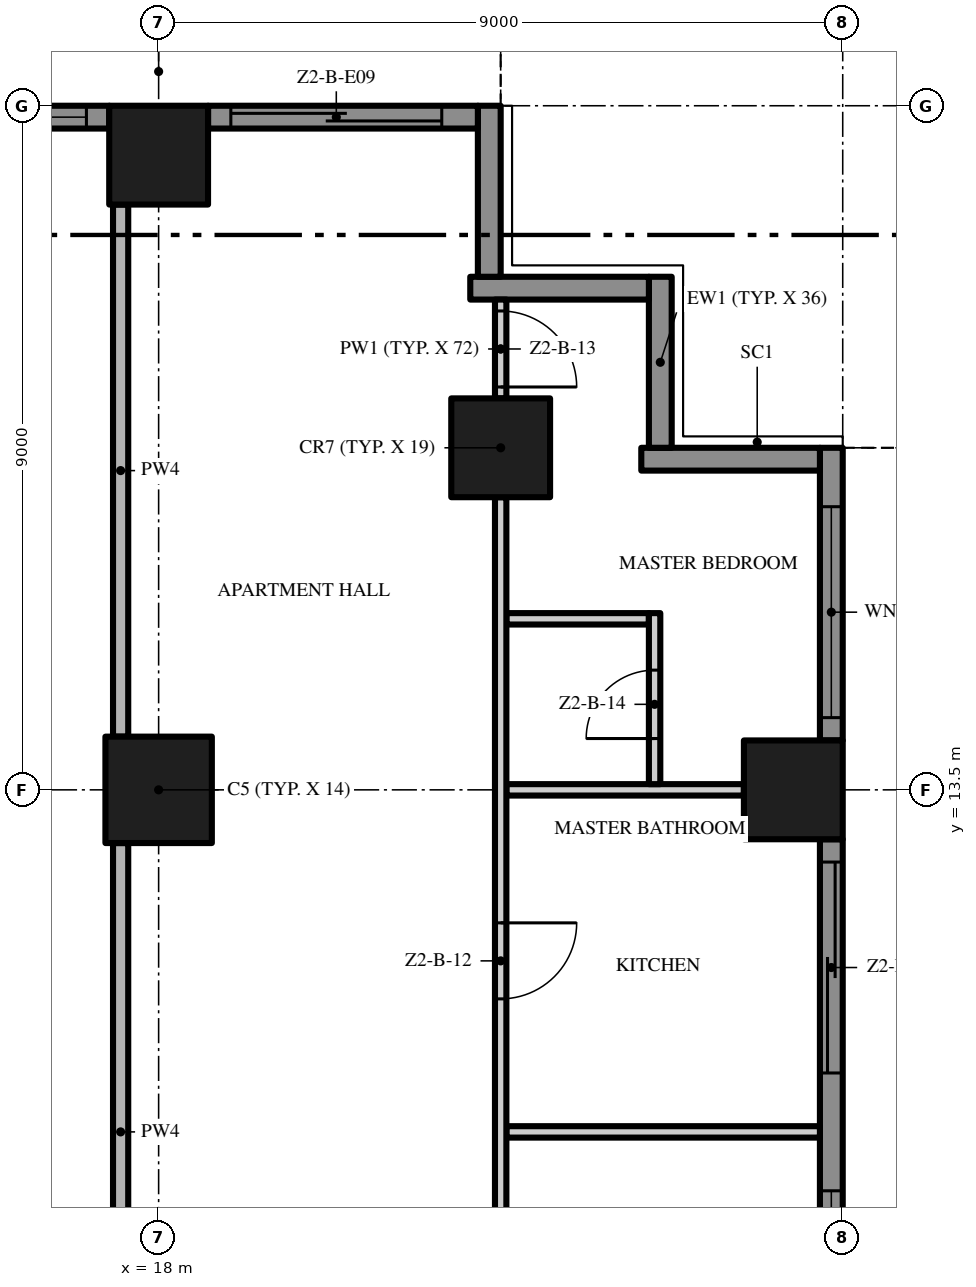
"""IFC4 building model, lengths in metres.
Left out: names, types, materials, properties, quantities, classifications, styles, units other than length and angle.
Written with IfcOpenShell. Run it as: python <this file> out.ifc"""

import sys

from ifc_helpers import new_model, si_unit, direction, frame, frame_2d, origin, origin_2d, place, context, subcontext, project, spatial, polyline, rectangle, outline, extrude, element, fill, save


model = new_model("IFC4")
c1 = context("Model", 3, precision=1e-05, world=origin(), true_north=direction((0.0, 1.0)))
c2 = subcontext(c1, "Body", "Model", "MODEL_VIEW")
j1 = project(units=[si_unit("LENGTHUNIT", "METRE"), si_unit("PLANEANGLEUNIT", "RADIAN")], contexts=[c1])
p1 = place(None, origin())
s1 = spatial("IfcSite", under=j1, at=p1, CompositionType="ELEMENT")
p2 = place(p1, origin())
s2 = spatial("IfcBuilding", under=s1, at=p2, CompositionType="ELEMENT")
p3 = place(p2, frame((0.0, 0.0, 84.6)))
s3 = spatial("IfcBuildingStorey", under=s2, at=p3, CompositionType="ELEMENT", Elevation=84.6)
p4 = place(p3, frame((18.0, 13.5, 0.0), z_axis=(0.0, 0.0, 1.0), x_axis=(1.0, 0.0, 0.0)))
e1 = element("IfcColumn", 1, at=p4, inside=s3, PredefinedType="COLUMN", context=c2, shape_type="SweptSolid", body=[
    extrude(rectangle(XDim=1.4, YDim=1.4, at=origin_2d()), origin(), (0.0, 0.0, 1.0), 3.5),
])
for number, where, z_axis, x_axis in (
    (2, (18.0, 21.85, 0.0), (0.0, 0.0, 1.0), (1.0, 0.0, 0.0)),
    (3, (26.35, 13.5, 0.0), (0.0, 0.0, 1.0), (1.0, 0.0, 0.0)),
    (4, (22.5, 18.0, 0.0), (0.0, 0.0, 1.0), (1.0, 0.0, 0.0)),
):
    element("IfcColumn", number, at=place(p3, frame(where, z_axis=z_axis, x_axis=x_axis)), inside=s3, PredefinedType="COLUMN", context=c2, shape_type="SweptSolid", body=[
        extrude(rectangle(XDim=1.3, YDim=1.3, at=origin_2d()), origin(), (0.0, 0.0, 1.0), 3.5),
    ])
p5 = place(p3, frame((26.85, 12.85, 0.0), z_axis=(0.0, 0.0, 1.0), x_axis=(0.0, -1.0, 0.0)))
e5 = element("IfcWall", 5, at=p5, inside=s3, PredefinedType="SOLIDWALL", context=c2, shape_type="SweptSolid", body=[
    extrude(rectangle(XDim=7.7, YDim=0.3, at=frame_2d((3.85, 0.0))), origin(), (0.0, 0.0, 1.0), 3.5),
])
p6 = place(p5, frame((4.625, 0.0, 0.45)))
e6 = element("IfcOpeningElement", 6, at=p6, cuts=e5, PredefinedType="OPENING", context=c2, shape_type="SweptSolid", body=[
    extrude(rectangle(XDim=2.775, YDim=2.65, at=frame_2d((1.387, 1.325))), frame((0.0, 0.16, 0.0), z_axis=(0.0, -1.0, 0.0), x_axis=(1.0, 0.0, 0.0)), (0.0, 0.0, 1.0), 0.32),
])
p7 = place(p5, frame((0.3, 0.0, 0.0)))
e7 = element("IfcOpeningElement", 7, at=p7, cuts=e5, PredefinedType="OPENING", context=c2, shape_type="SweptSolid", body=[
    extrude(rectangle(XDim=2.775, YDim=2.4, at=frame_2d((1.387, 1.2))), frame((0.0, 0.16, 0.0), z_axis=(0.0, -1.0, 0.0), x_axis=(1.0, 0.0, 0.0)), (0.0, 0.0, 1.0), 0.32),
])
p8 = place(p3, frame((26.85, 18.0, 0.0), z_axis=(0.0, 0.0, 1.0), x_axis=(0.0, -1.0, 0.0)))
e8 = element("IfcWall", 8, at=p8, inside=s3, PredefinedType="SOLIDWALL", context=c2, shape_type="SweptSolid", body=[
    extrude(rectangle(XDim=3.85, YDim=0.3, at=frame_2d((1.925, 0.0))), origin(), (0.0, 0.0, 1.0), 3.5),
])
p9 = place(p8, frame((0.775, 0.0, 0.45)))
e9 = element("IfcOpeningElement", 9, at=p9, cuts=e8, PredefinedType="OPENING", context=c2, shape_type="SweptSolid", body=[
    extrude(rectangle(XDim=2.775, YDim=2.65, at=frame_2d((1.387, 1.325))), frame((0.0, 0.16, 0.0), z_axis=(0.0, -1.0, 0.0), x_axis=(1.0, 0.0, 0.0)), (0.0, 0.0, 1.0), 0.32),
])
p10 = place(p3, frame((24.35, 17.85, 0.0), z_axis=(0.0, 0.0, 1.0), x_axis=(1.0, 0.0, 0.0)))
e10 = element("IfcWall", 10, at=p10, inside=s3, PredefinedType="SOLIDWALL", context=c2, shape_type="SweptSolid", body=[
    extrude(rectangle(XDim=2.35, YDim=0.3, at=frame_2d((1.175, 0.0))), origin(), (0.0, 0.0, 1.0), 3.5),
])
p11 = place(p3, frame((24.6, 20.25, 0.0), z_axis=(0.0, 0.0, 1.0), x_axis=(0.0, -1.0, 0.0)))
e11 = element("IfcWall", 11, at=p11, inside=s3, PredefinedType="SOLIDWALL", context=c2, shape_type="SweptSolid", body=[
    extrude(rectangle(XDim=2.25, YDim=0.3, at=frame_2d((1.125, 0.0))), origin(), (0.0, 0.0, 1.0), 3.5),
])
p12 = place(p3, frame((22.1, 20.1, 0.0), z_axis=(0.0, 0.0, 1.0), x_axis=(1.0, 0.0, 0.0)))
e12 = element("IfcWall", 12, at=p12, inside=s3, PredefinedType="SOLIDWALL", context=c2, shape_type="SweptSolid", body=[
    extrude(rectangle(XDim=2.35, YDim=0.3, at=frame_2d((1.175, 0.0))), origin(), (0.0, 0.0, 1.0), 3.5),
])
p13 = place(p3, frame((22.35, 22.5, 0.0), z_axis=(0.0, 0.0, 1.0), x_axis=(0.0, -1.0, 0.0)))
e13 = element("IfcWall", 13, at=p13, inside=s3, PredefinedType="SOLIDWALL", context=c2, shape_type="SweptSolid", body=[
    extrude(rectangle(XDim=2.25, YDim=0.3, at=frame_2d((1.125, 0.0))), origin(), (0.0, 0.0, 1.0), 3.5),
])
p14 = place(p3, frame((18.65, 22.35, 0.0), z_axis=(0.0, 0.0, 1.0), x_axis=(1.0, 0.0, 0.0)))
e14 = element("IfcWall", 14, at=p14, inside=s3, PredefinedType="SOLIDWALL", context=c2, shape_type="SweptSolid", body=[
    extrude(rectangle(XDim=3.55, YDim=0.3, at=frame_2d((1.775, 0.0))), origin(), (0.0, 0.0, 1.0), 3.5),
])
p15 = place(p14, frame((0.3, 0.0, 0.0)))
e15 = element("IfcOpeningElement", 15, at=p15, cuts=e14, PredefinedType="OPENING", context=c2, shape_type="SweptSolid", body=[
    extrude(rectangle(XDim=2.775, YDim=2.4, at=frame_2d((1.387, 1.2))), frame((0.0, 0.16, 0.0), z_axis=(0.0, -1.0, 0.0), x_axis=(1.0, 0.0, 0.0)), (0.0, 0.0, 1.0), 0.32),
])
p16 = place(p3, frame((13.5, 22.35, 0.0), z_axis=(0.0, 0.0, 1.0), x_axis=(1.0, 0.0, 0.0)))
e16 = element("IfcWall", 16, at=p16, inside=s3, PredefinedType="SOLIDWALL", context=c2, shape_type="SweptSolid", body=[
    extrude(rectangle(XDim=3.85, YDim=0.3, at=frame_2d((1.925, 0.0))), origin(), (0.0, 0.0, 1.0), 3.5),
])
p17 = place(p16, frame((0.775, 0.0, 0.45)))
e17 = element("IfcOpeningElement", 17, at=p17, cuts=e16, PredefinedType="OPENING", context=c2, shape_type="SweptSolid", body=[
    extrude(rectangle(XDim=2.775, YDim=2.65, at=frame_2d((1.387, 1.325))), frame((0.0, 0.16, 0.0), z_axis=(0.0, -1.0, 0.0), x_axis=(1.0, 0.0, 0.0)), (0.0, 0.0, 1.0), 0.32),
])
p18 = place(p3, origin())
e18 = element("IfcWall", 18, at=p18, inside=s3, PredefinedType="USERDEFINED", context=c2, shape_type="SweptSolid", body=[
    extrude(outline(polyline([(30.0, -18.0), (29.771, -16.5), (29.171, -15.0), (28.429, -13.5), (27.829, -12.0), (27.6, -10.5), (27.829, -9.0), (28.429, -7.5), (29.171, -6.0), (29.771, -4.5), (30.0, -3.0), (29.771, -1.5), (29.171, 0.0), (28.429, 1.5), (27.829, 3.0), (27.6, 4.5), (27.829, 6.0), (28.429, 7.5), (29.171, 9.0), (29.771, 10.5), (30.0, 12.0), (29.771, 13.5), (29.171, 15.0), (28.429, 16.5), (27.829, 18.0), (27.597, 17.907), (28.201, 16.398), (28.942, 14.898), (29.528, 13.434), (29.747, 12.0), (29.528, 10.566), (28.942, 9.102), (28.201, 7.602), (27.586, 6.066), (27.347, 4.5), (27.586, 2.934), (28.201, 1.398), (28.942, -0.102), (29.528, -1.566), (29.747, -3.0), (29.528, -4.434), (28.942, -5.898), (28.201, -7.398), (27.586, -8.934), (27.347, -10.5), (27.586, -12.066), (28.201, -13.602), (28.942, -15.102), (29.528, -16.566), (29.753, -18.038), (30.0, -18.0)])), origin(), (0.0, 0.0, 1.0), 0.9),
])
p19 = place(p3, origin())
e19 = element("IfcWall", 19, at=p19, inside=s3, PredefinedType="USERDEFINED", context=c2, shape_type="SweptSolid", body=[
    extrude(outline(polyline([(22.5, 25.5), (21.0, 25.271), (19.5, 24.671), (18.0, 23.929), (16.5, 23.329), (15.0, 23.1), (13.5, 23.329), (13.462, 23.082), (15.0, 22.847), (16.566, 23.086), (18.102, 23.701), (19.602, 24.442), (21.066, 25.028), (22.538, 25.253), (22.5, 25.5)])), origin(), (0.0, 0.0, 1.0), 0.9),
])
p20 = place(p3, frame((22.575, 9.0, 0.0), z_axis=(0.0, 0.0, 1.0), x_axis=(1.0, 0.0, 0.0)))
e20 = element("IfcWall", 20, at=p20, inside=s3, PredefinedType="PARTITIONING", context=c2, shape_type="SweptSolid", body=[
    extrude(rectangle(XDim=4.125, YDim=0.15, at=frame_2d((2.062, 0.0))), origin(), (0.0, 0.0, 1.0), 3.5),
])
p21 = place(p3, frame((22.575, 13.5, 0.0), z_axis=(0.0, 0.0, 1.0), x_axis=(1.0, 0.0, 0.0)))
e21 = element("IfcWall", 21, at=p21, inside=s3, PredefinedType="PARTITIONING", context=c2, shape_type="SweptSolid", body=[
    extrude(rectangle(XDim=3.125, YDim=0.15, at=frame_2d((1.562, 0.0))), origin(), (0.0, 0.0, 1.0), 3.5),
])
p22 = place(p3, frame((22.575, 15.75, 0.0), z_axis=(0.0, 0.0, 1.0), x_axis=(1.0, 0.0, 0.0)))
e22 = element("IfcWall", 22, at=p22, inside=s3, PredefinedType="PARTITIONING", context=c2, shape_type="SweptSolid", body=[
    extrude(rectangle(XDim=1.875, YDim=0.15, at=frame_2d((0.938, 0.0))), origin(), (0.0, 0.0, 1.0), 3.5),
])
p23 = place(p3, frame((17.5, 12.8, 0.0), z_axis=(0.0, 0.0, 1.0), x_axis=(0.0, -1.0, 0.0)))
e23 = element("IfcWall", 23, at=p23, inside=s3, PredefinedType="PARTITIONING", context=c2, shape_type="SweptSolid", body=[
    extrude(rectangle(XDim=7.6, YDim=0.2, at=frame_2d((3.8, 0.0))), origin(), (0.0, 0.0, 1.0), 3.5),
])
p24 = place(p23, frame((5.45, 0.0, 0.0)))
e24 = element("IfcOpeningElement", 24, at=p24, cuts=e23, PredefinedType="OPENING", context=c2, shape_type="SweptSolid", body=[
    extrude(rectangle(XDim=1.2, YDim=2.4, at=frame_2d((0.6, 1.2))), frame((0.0, 0.11, 0.0), z_axis=(0.0, -1.0, 0.0), x_axis=(1.0, 0.0, 0.0)), (0.0, 0.0, 1.0), 0.22),
])
p25 = place(p3, frame((17.5, 14.2, 0.0), z_axis=(0.0, 0.0, 1.0), x_axis=(0.0, 1.0, 0.0)))
e25 = element("IfcWall", 25, at=p25, inside=s3, PredefinedType="PARTITIONING", context=c2, shape_type="SweptSolid", body=[
    extrude(rectangle(XDim=7.0, YDim=0.2, at=frame_2d((3.5, 0.0))), origin(), (0.0, 0.0, 1.0), 3.5),
])
p26 = place(p3, frame((22.5, 17.35, 0.0), z_axis=(0.0, 0.0, 1.0), x_axis=(0.0, -1.0, 0.0)))
e26 = element("IfcWall", 26, at=p26, inside=s3, PredefinedType="PARTITIONING", context=c2, shape_type="SweptSolid", body=[
    extrude(rectangle(XDim=17.25, YDim=0.15, at=frame_2d((8.625, 0.0))), origin(), (0.0, 0.0, 1.0), 3.5),
])
p27 = place(p26, frame((13.05, 0.0, 0.0)))
e27 = element("IfcOpeningElement", 27, at=p27, cuts=e26, PredefinedType="OPENING", context=c2, shape_type="SweptSolid", body=[
    extrude(rectangle(XDim=1.8, YDim=2.4, at=frame_2d((0.9, 1.2))), frame((0.0, 0.085, 0.0), z_axis=(0.0, -1.0, 0.0), x_axis=(1.0, 0.0, 0.0)), (0.0, 0.0, 1.0), 0.17),
])
p28 = place(p26, frame((5.6, 0.0, 0.0)))
e28 = element("IfcOpeningElement", 28, at=p28, cuts=e26, PredefinedType="OPENING", context=c2, shape_type="SweptSolid", body=[
    extrude(rectangle(XDim=1.0, YDim=2.4, at=frame_2d((0.5, 1.2))), frame((0.0, 0.085, 0.0), z_axis=(0.0, -1.0, 0.0), x_axis=(1.0, 0.0, 0.0)), (0.0, 0.0, 1.0), 0.17),
])
p29 = place(p3, frame((22.5, 19.95, 0.0), z_axis=(0.0, 0.0, 1.0), x_axis=(0.0, -1.0, 0.0)))
e29 = element("IfcWall", 29, at=p29, inside=s3, PredefinedType="PARTITIONING", context=c2, shape_type="SweptSolid", body=[
    extrude(rectangle(XDim=1.3, YDim=0.15, at=frame_2d((0.65, 0.0))), origin(), (0.0, 0.0, 1.0), 3.5),
])
p30 = place(p29, frame((0.15, 0.0, 0.0)))
e30 = element("IfcOpeningElement", 30, at=p30, cuts=e29, PredefinedType="OPENING", context=c2, shape_type="SweptSolid", body=[
    extrude(rectangle(XDim=1.0, YDim=2.4, at=frame_2d((0.5, 1.2))), frame((0.0, 0.085, 0.0), z_axis=(0.0, -1.0, 0.0), x_axis=(1.0, 0.0, 0.0)), (0.0, 0.0, 1.0), 0.17),
])
p31 = place(p3, frame((24.525, 13.575, 0.0), z_axis=(0.0, 0.0, 1.0), x_axis=(0.0, 1.0, 0.0)))
e31 = element("IfcWall", 31, at=p31, inside=s3, PredefinedType="PARTITIONING", context=c2, shape_type="SweptSolid", body=[
    extrude(rectangle(XDim=2.25, YDim=0.15, at=frame_2d((1.125, 0.0))), origin(), (0.0, 0.0, 1.0), 3.5),
])
p32 = place(p31, frame((0.6, 0.0, 0.0)))
e32 = element("IfcOpeningElement", 32, at=p32, cuts=e31, PredefinedType="OPENING", context=c2, shape_type="SweptSolid", body=[
    extrude(rectangle(XDim=0.9, YDim=2.1, at=frame_2d((0.45, 1.05))), frame((0.0, 0.085, 0.0), z_axis=(0.0, -1.0, 0.0), x_axis=(1.0, 0.0, 0.0)), (0.0, 0.0, 1.0), 0.17),
])
p33 = place(p6, origin())
e33 = element("IfcWindow", 33, at=p33, inside=s3, PartitioningType="SINGLE_PANEL", PredefinedType="WINDOW", context=c2, shape_type="SweptSolid", body=[
    extrude(rectangle(XDim=2.775, YDim=2.65, at=frame_2d((1.387, 1.325))), frame((0.0, 0.03, 0.0), z_axis=(0.0, -1.0, 0.0), x_axis=(1.0, 0.0, 0.0)), (0.0, 0.0, 1.0), 0.06),
])
fill(e6, e33)
p34 = place(p7, origin())
e34 = element("IfcDoor", 34, at=p34, inside=s3, OperationType="SINGLE_SWING_LEFT", PredefinedType="DOOR", context=c2, shape_type="SweptSolid", body=[
    extrude(rectangle(XDim=2.775, YDim=2.4, at=frame_2d((1.387, 1.2))), frame((0.0, 0.025, 0.0), z_axis=(0.0, -1.0, 0.0), x_axis=(1.0, 0.0, 0.0)), (0.0, 0.0, 1.0), 0.05),
])
fill(e7, e34)
p35 = place(p9, origin())
e35 = element("IfcWindow", 35, at=p35, inside=s3, PartitioningType="SINGLE_PANEL", PredefinedType="WINDOW", context=c2, shape_type="SweptSolid", body=[
    extrude(rectangle(XDim=2.775, YDim=2.65, at=frame_2d((1.387, 1.325))), frame((0.0, 0.03, 0.0), z_axis=(0.0, -1.0, 0.0), x_axis=(1.0, 0.0, 0.0)), (0.0, 0.0, 1.0), 0.06),
])
fill(e9, e35)
p36 = place(p15, origin())
e36 = element("IfcDoor", 36, at=p36, inside=s3, OperationType="SINGLE_SWING_LEFT", PredefinedType="DOOR", context=c2, shape_type="SweptSolid", body=[
    extrude(rectangle(XDim=2.775, YDim=2.4, at=frame_2d((1.387, 1.2))), frame((0.0, 0.025, 0.0), z_axis=(0.0, -1.0, 0.0), x_axis=(1.0, 0.0, 0.0)), (0.0, 0.0, 1.0), 0.05),
])
fill(e15, e36)
p37 = place(p17, origin())
e37 = element("IfcWindow", 37, at=p37, inside=s3, PartitioningType="SINGLE_PANEL", PredefinedType="WINDOW", context=c2, shape_type="SweptSolid", body=[
    extrude(rectangle(XDim=2.775, YDim=2.65, at=frame_2d((1.387, 1.325))), frame((0.0, 0.03, 0.0), z_axis=(0.0, -1.0, 0.0), x_axis=(1.0, 0.0, 0.0)), (0.0, 0.0, 1.0), 0.06),
])
fill(e17, e37)
p38 = place(p28, origin())
e38 = element("IfcDoor", 38, at=p38, inside=s3, OperationType="SINGLE_SWING_LEFT", PredefinedType="DOOR", context=c2, shape_type="SweptSolid", body=[
    extrude(rectangle(XDim=1.0, YDim=2.4, at=frame_2d((0.5, 1.2))), frame((0.0, 0.025, 0.0), z_axis=(0.0, -1.0, 0.0), x_axis=(1.0, 0.0, 0.0)), (0.0, 0.0, 1.0), 0.05),
])
fill(e28, e38)
p39 = place(p30, origin())
e39 = element("IfcDoor", 39, at=p39, inside=s3, OperationType="SINGLE_SWING_RIGHT", PredefinedType="DOOR", context=c2, shape_type="SweptSolid", body=[
    extrude(rectangle(XDim=1.0, YDim=2.4, at=frame_2d((0.5, 1.2))), frame((0.0, 0.025, 0.0), z_axis=(0.0, -1.0, 0.0), x_axis=(1.0, 0.0, 0.0)), (0.0, 0.0, 1.0), 0.05),
])
fill(e30, e39)
p40 = place(p32, origin())
e40 = element("IfcDoor", 40, at=p40, inside=s3, OperationType="SINGLE_SWING_LEFT", PredefinedType="DOOR", context=c2, shape_type="SweptSolid", body=[
    extrude(rectangle(XDim=0.9, YDim=2.1, at=frame_2d((0.45, 1.05))), frame((0.0, 0.025, 0.0), z_axis=(0.0, -1.0, 0.0), x_axis=(1.0, 0.0, 0.0)), (0.0, 0.0, 1.0), 0.05),
])
fill(e32, e40)
save(model, sys.argv[1])
